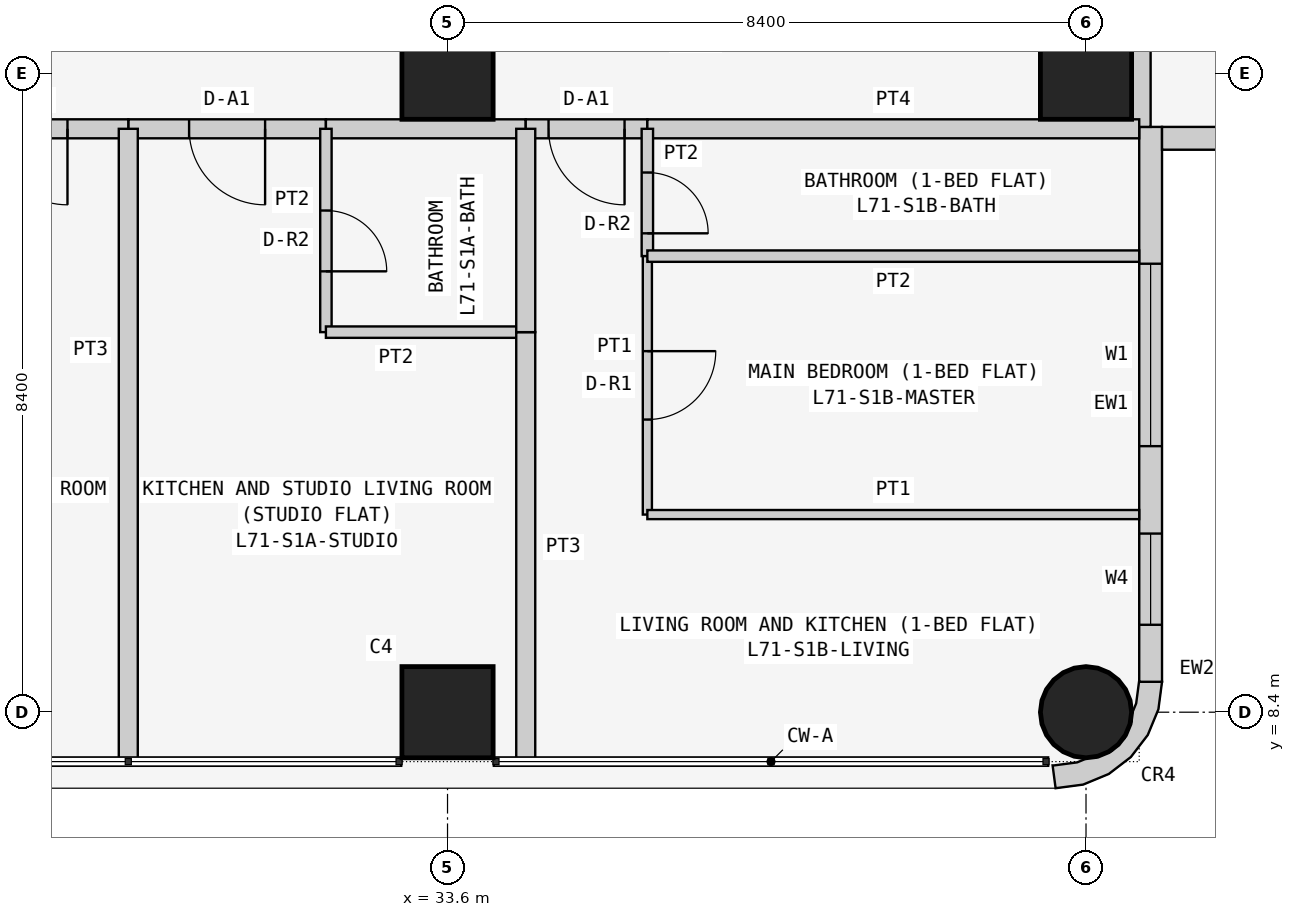
"""IFC4 building model, lengths in metres.
Left out: names, types, materials, properties, quantities, classifications, styles, units other than length and angle.
Written with IfcOpenShell. Run it as: python <this file> out.ifc"""

import sys

from ifc_helpers import new_model, si_unit, direction, frame, frame_2d, origin, origin_2d, place, context, subcontext, project, spatial, polyline, rectangle, circle, outline, extrude, element, fill, save


model = new_model("IFC4")
c1 = context("Model", 3, precision=1e-05, world=origin(), true_north=direction((0.0, 1.0)))
c2 = subcontext(c1, "Body", "Model", "MODEL_VIEW")
j1 = project(units=[si_unit("LENGTHUNIT", "METRE"), si_unit("PLANEANGLEUNIT", "RADIAN")], contexts=[c1])
p1 = place(None, origin())
s1 = spatial("IfcSite", under=j1, at=p1, CompositionType="ELEMENT")
p2 = place(p1, origin())
s2 = spatial("IfcBuilding", under=s1, at=p2, CompositionType="ELEMENT")
p3 = place(p2, frame((0.0, 0.0, 272.1)))
s3 = spatial("IfcBuildingStorey", under=s2, at=p3, CompositionType="ELEMENT", Elevation=272.1)
for number, where, z_axis, x_axis in (
    (1, (33.6, 8.4, 0.0), (0.0, 0.0, 1.0), (1.0, 0.0, 0.0)),
    (2, (33.6, 16.8, 0.0), (0.0, 0.0, 1.0), (1.0, 0.0, 0.0)),
):
    element("IfcColumn", number, at=place(p3, frame(where, z_axis=z_axis, x_axis=x_axis)), inside=s3, PredefinedType="COLUMN", context=c2, shape_type="SweptSolid", body=[
        extrude(rectangle(XDim=1.2, YDim=1.2, at=origin_2d()), origin(), (0.0, 0.0, 1.0), 3.6),
    ])
p4 = place(p3, frame((42.0, 8.4, 0.0), z_axis=(0.0, 0.0, 1.0), x_axis=(1.0, 0.0, 0.0)))
e3 = element("IfcColumn", 3, at=p4, inside=s3, PredefinedType="COLUMN", context=c2, shape_type="SweptSolid", body=[
    extrude(circle(Radius=0.6, at=origin_2d()), origin(), (0.0, 0.0, 1.0), 3.6),
])
p5 = place(p3, frame((42.0, 16.8, 0.0), z_axis=(0.0, 0.0, 1.0), x_axis=(1.0, 0.0, 0.0)))
e4 = element("IfcColumn", 4, at=p5, inside=s3, PredefinedType="COLUMN", context=c2, shape_type="SweptSolid", body=[
    extrude(rectangle(XDim=1.2, YDim=1.2, at=origin_2d()), origin(), (0.0, 0.0, 1.0), 3.6),
])
p6 = place(p3, frame((42.85, 8.8, 0.0), z_axis=(0.0, 0.0, 1.0), x_axis=(0.0, 1.0, 0.0)))
e5 = element("IfcWall", 5, at=p6, inside=s3, PredefinedType="SOLIDWALL", context=c2, shape_type="SweptSolid", body=[
    extrude(rectangle(XDim=7.3, YDim=0.3, at=frame_2d((3.65, 0.0))), origin(), (0.0, 0.0, 1.0), 3.45),
])
p7 = place(p6, frame((3.1, 0.0, 0.9)))
e6 = element("IfcOpeningElement", 6, at=p7, cuts=e5, PredefinedType="OPENING", context=c2, shape_type="SweptSolid", body=[
    extrude(rectangle(XDim=2.4, YDim=1.5, at=frame_2d((1.2, 0.75))), frame((0.0, 0.16, 0.0), z_axis=(0.0, -1.0, 0.0), x_axis=(1.0, 0.0, 0.0)), (0.0, 0.0, 1.0), 0.32),
])
p8 = place(p6, frame((0.75, 0.0, 0.9)))
e7 = element("IfcOpeningElement", 7, at=p8, cuts=e5, PredefinedType="OPENING", context=c2, shape_type="SweptSolid", body=[
    extrude(rectangle(XDim=1.2, YDim=1.5, at=frame_2d((0.6, 0.75))), frame((0.0, 0.16, 0.0), z_axis=(0.0, -1.0, 0.0), x_axis=(1.0, 0.0, 0.0)), (0.0, 0.0, 1.0), 0.32),
])
p9 = place(p3, frame((43.0, 15.95, 0.0), z_axis=(0.0, 0.0, 1.0), x_axis=(1.0, 0.0, 0.0)))
e8 = element("IfcWall", 8, at=p9, inside=s3, PredefinedType="SOLIDWALL", context=c2, shape_type="SweptSolid", body=[
    extrude(rectangle(XDim=7.0, YDim=0.3, at=frame_2d((3.5, 0.0))), origin(), (0.0, 0.0, 1.0), 3.45),
])
p10 = place(p9, frame((1.5, 0.0, 0.9)))
e9 = element("IfcOpeningElement", 9, at=p10, cuts=e8, PredefinedType="OPENING", context=c2, shape_type="SweptSolid", body=[
    extrude(rectangle(XDim=2.4, YDim=1.5, at=frame_2d((1.2, 0.75))), frame((0.0, 0.16, 0.0), z_axis=(0.0, -1.0, 0.0), x_axis=(1.0, 0.0, 0.0)), (0.0, 0.0, 1.0), 0.32),
])
p11 = place(p9, frame((5.05, 0.0, 0.9)))
e10 = element("IfcOpeningElement", 10, at=p11, cuts=e8, PredefinedType="OPENING", context=c2, shape_type="SweptSolid", body=[
    extrude(rectangle(XDim=1.2, YDim=1.5, at=frame_2d((0.6, 0.75))), frame((0.0, 0.16, 0.0), z_axis=(0.0, -1.0, 0.0), x_axis=(1.0, 0.0, 0.0)), (0.0, 0.0, 1.0), 0.32),
])
p12 = place(p3, frame((41.638, 7.824, 0.0), z_axis=(0.0, 0.0, 1.0), x_axis=(0.707106781187, -0.707106781187, 0.0)))
e11 = element("IfcWall", 11, at=p12, inside=s3, PredefinedType="SOLIDWALL", context=c2, shape_type="SweptSolid", body=[
    extrude(outline(polyline([(0.033, 1.469), (0.047, 1.455), (0.233, 1.212), (0.292, 1.069), (0.358, 1.003), (0.449, 0.782), (0.449, 0.543), (0.358, 0.322), (0.292, 0.257), (0.233, 0.114), (0.047, -0.129), (0.033, -0.143), (0.273, -0.327), (0.495, -0.037), (0.635, 0.301), (0.683, 0.663), (0.635, 1.025), (0.495, 1.363), (0.273, 1.653), (0.033, 1.469)])), origin(), (0.0, 0.0, 1.0), 3.45),
])
p13 = place(p3, frame((42.725, 22.971, 0.0), z_axis=(0.0, 0.0, 1.0), x_axis=(0.0, -1.0, 0.0)))
e12 = element("IfcWall", 12, at=p13, inside=s3, PredefinedType="PARTITIONING", context=c2, shape_type="SweptSolid", body=[
    extrude(rectangle(XDim=6.871, YDim=0.25, at=frame_2d((3.436, 0.0))), origin(), (0.0, 0.0, 1.0), 3.45),
])
p14 = place(p3, frame((32.0, 16.075, 0.0), z_axis=(0.0, 0.0, 1.0), x_axis=(-1.0, 0.0, 0.0)))
e13 = element("IfcWall", 13, at=p14, inside=s3, PredefinedType="PARTITIONING", context=c2, shape_type="SweptSolid", body=[
    extrude(rectangle(XDim=2.6, YDim=0.25, at=frame_2d((1.3, 0.0))), origin(), (0.0, 0.0, 1.0), 3.45),
])
p15 = place(p14, frame((0.8, 0.0, 0.0)))
e14 = element("IfcOpeningElement", 14, at=p15, cuts=e13, PredefinedType="OPENING", context=c2, shape_type="SweptSolid", body=[
    extrude(rectangle(XDim=1.0, YDim=2.1, at=frame_2d((0.5, 1.05))), frame((0.0, 0.135, 0.0), z_axis=(0.0, -1.0, 0.0), x_axis=(1.0, 0.0, 0.0)), (0.0, 0.0, 1.0), 0.27),
])
p16 = place(p3, frame((34.629, 16.075, 0.0), z_axis=(0.0, 0.0, 1.0), x_axis=(-1.0, 0.0, 0.0)))
e15 = element("IfcWall", 15, at=p16, inside=s3, PredefinedType="PARTITIONING", context=c2, shape_type="SweptSolid", body=[
    extrude(rectangle(XDim=2.629, YDim=0.25, at=frame_2d((1.314, 0.0))), origin(), (0.0, 0.0, 1.0), 3.45),
])
p17 = place(p3, frame((36.229, 16.075, 0.0), z_axis=(0.0, 0.0, 1.0), x_axis=(-1.0, 0.0, 0.0)))
e16 = element("IfcWall", 16, at=p17, inside=s3, PredefinedType="PARTITIONING", context=c2, shape_type="SweptSolid", body=[
    extrude(rectangle(XDim=1.6, YDim=0.25, at=frame_2d((0.8, 0.0))), origin(), (0.0, 0.0, 1.0), 3.45),
])
p18 = place(p17, frame((0.3, 0.0, 0.0)))
e17 = element("IfcOpeningElement", 17, at=p18, cuts=e16, PredefinedType="OPENING", context=c2, shape_type="SweptSolid", body=[
    extrude(rectangle(XDim=1.0, YDim=2.1, at=frame_2d((0.5, 1.05))), frame((0.0, 0.135, 0.0), z_axis=(0.0, -1.0, 0.0), x_axis=(1.0, 0.0, 0.0)), (0.0, 0.0, 1.0), 0.27),
])
p19 = place(p3, frame((42.7, 16.075, 0.0), z_axis=(0.0, 0.0, 1.0), x_axis=(-1.0, 0.0, 0.0)))
e18 = element("IfcWall", 18, at=p19, inside=s3, PredefinedType="PARTITIONING", context=c2, shape_type="SweptSolid", body=[
    extrude(rectangle(XDim=6.471, YDim=0.25, at=frame_2d((3.235, 0.0))), origin(), (0.0, 0.0, 1.0), 3.45),
])
p20 = place(p3, frame((29.4, 16.075, 0.0), z_axis=(0.0, 0.0, 1.0), x_axis=(-1.0, 0.0, 0.0)))
e19 = element("IfcWall", 19, at=p20, inside=s3, PredefinedType="PARTITIONING", context=c2, shape_type="SweptSolid", body=[
    extrude(rectangle(XDim=2.6, YDim=0.25, at=frame_2d((1.3, 0.0))), origin(), (0.0, 0.0, 1.0), 3.45),
])
p21 = place(p20, frame((0.8, 0.0, 0.0)))
e20 = element("IfcOpeningElement", 20, at=p21, cuts=e19, PredefinedType="OPENING", context=c2, shape_type="SweptSolid", body=[
    extrude(rectangle(XDim=1.0, YDim=2.1, at=frame_2d((0.5, 1.05))), frame((0.0, 0.135, 0.0), z_axis=(0.0, -1.0, 0.0), x_axis=(1.0, 0.0, 0.0)), (0.0, 0.0, 1.0), 0.27),
])
p22 = place(p3, frame((32.0, 16.075, 0.0), z_axis=(0.0, 0.0, 1.0), x_axis=(0.0, -1.0, 0.0)))
e21 = element("IfcWall", 21, at=p22, inside=s3, PredefinedType="PARTITIONING", context=c2, shape_type="SweptSolid", body=[
    extrude(rectangle(XDim=2.675, YDim=0.15, at=frame_2d((1.337, 0.0))), origin(), (0.0, 0.0, 1.0), 3.45),
])
p23 = place(p22, frame((1.075, 0.0, 0.0)))
e22 = element("IfcOpeningElement", 22, at=p23, cuts=e21, PredefinedType="OPENING", context=c2, shape_type="SweptSolid", body=[
    extrude(rectangle(XDim=0.8, YDim=2.1, at=frame_2d((0.4, 1.05))), frame((0.0, 0.085, 0.0), z_axis=(0.0, -1.0, 0.0), x_axis=(1.0, 0.0, 0.0)), (0.0, 0.0, 1.0), 0.17),
])
p24 = place(p3, frame((32.0, 13.4, 0.0), z_axis=(0.0, 0.0, 1.0), x_axis=(1.0, 0.0, 0.0)))
e23 = element("IfcWall", 23, at=p24, inside=s3, PredefinedType="PARTITIONING", context=c2, shape_type="SweptSolid", body=[
    extrude(rectangle(XDim=2.629, YDim=0.15, at=frame_2d((1.314, 0.0))), origin(), (0.0, 0.0, 1.0), 3.45),
])
p25 = place(p3, frame((34.629, 13.4, 0.0), z_axis=(0.0, 0.0, 1.0), x_axis=(0.0, -1.0, 0.0)))
e24 = element("IfcWall", 24, at=p25, inside=s3, PredefinedType="PARTITIONING", context=c2, shape_type="SweptSolid", body=[
    extrude(rectangle(XDim=5.65, YDim=0.25, at=frame_2d((2.825, 0.0))), origin(), (0.0, 0.0, 1.0), 3.45),
])
p26 = place(p3, frame((29.4, 7.75, 0.0), z_axis=(0.0, 0.0, 1.0), x_axis=(0.0, 1.0, 0.0)))
e25 = element("IfcWall", 25, at=p26, inside=s3, PredefinedType="PARTITIONING", context=c2, shape_type="SweptSolid", body=[
    extrude(rectangle(XDim=8.325, YDim=0.25, at=frame_2d((4.163, 0.0))), origin(), (0.0, 0.0, 1.0), 2.848),
])
p27 = place(p3, frame((34.629, 13.4, 0.0), z_axis=(0.0, 0.0, 1.0), x_axis=(0.0, 1.0, 0.0)))
e26 = element("IfcWall", 26, at=p27, inside=s3, PredefinedType="PARTITIONING", context=c2, shape_type="SweptSolid", body=[
    extrude(rectangle(XDim=2.675, YDim=0.25, at=frame_2d((1.337, 0.0))), origin(), (0.0, 0.0, 1.0), 3.45),
])
p28 = place(p3, frame((36.229, 16.075, 0.0), z_axis=(0.0, 0.0, 1.0), x_axis=(0.0, -1.0, 0.0)))
e27 = element("IfcWall", 27, at=p28, inside=s3, PredefinedType="PARTITIONING", context=c2, shape_type="SweptSolid", body=[
    extrude(rectangle(XDim=1.675, YDim=0.15, at=frame_2d((0.837, 0.0))), origin(), (0.0, 0.0, 1.0), 3.45),
])
p29 = place(p28, frame((0.575, 0.0, 0.0)))
e28 = element("IfcOpeningElement", 28, at=p29, cuts=e27, PredefinedType="OPENING", context=c2, shape_type="SweptSolid", body=[
    extrude(rectangle(XDim=0.8, YDim=2.1, at=frame_2d((0.4, 1.05))), frame((0.0, 0.085, 0.0), z_axis=(0.0, -1.0, 0.0), x_axis=(1.0, 0.0, 0.0)), (0.0, 0.0, 1.0), 0.17),
])
p30 = place(p3, frame((36.229, 14.4, 0.0), z_axis=(0.0, 0.0, 1.0), x_axis=(0.0, -1.0, 0.0)))
e29 = element("IfcWall", 29, at=p30, inside=s3, PredefinedType="PARTITIONING", context=c2, shape_type="SweptSolid", body=[
    extrude(rectangle(XDim=3.4, YDim=0.12, at=frame_2d((1.7, 0.0))), origin(), (0.0, 0.0, 1.0), 3.45),
])
p31 = place(p30, frame((1.25, 0.0, 0.0)))
e30 = element("IfcOpeningElement", 30, at=p31, cuts=e29, PredefinedType="OPENING", context=c2, shape_type="SweptSolid", body=[
    extrude(rectangle(XDim=0.9, YDim=2.1, at=frame_2d((0.45, 1.05))), frame((0.0, 0.07, 0.0), z_axis=(0.0, -1.0, 0.0), x_axis=(1.0, 0.0, 0.0)), (0.0, 0.0, 1.0), 0.14),
])
p32 = place(p3, frame((36.229, 11.0, 0.0), z_axis=(0.0, 0.0, 1.0), x_axis=(1.0, 0.0, 0.0)))
e31 = element("IfcWall", 31, at=p32, inside=s3, PredefinedType="PARTITIONING", context=c2, shape_type="SweptSolid", body=[
    extrude(rectangle(XDim=6.471, YDim=0.12, at=frame_2d((3.235, 0.0))), origin(), (0.0, 0.0, 1.0), 3.45),
])
p33 = place(p3, frame((36.229, 14.4, 0.0), z_axis=(0.0, 0.0, 1.0), x_axis=(1.0, 0.0, 0.0)))
e32 = element("IfcWall", 32, at=p33, inside=s3, PredefinedType="PARTITIONING", context=c2, shape_type="SweptSolid", body=[
    extrude(rectangle(XDim=6.471, YDim=0.15, at=frame_2d((3.235, 0.0))), origin(), (0.0, 0.0, 1.0), 3.45),
])
p34 = place(p7, origin())
e33 = element("IfcWindow", 33, at=p34, inside=s3, PartitioningType="SINGLE_PANEL", PredefinedType="WINDOW", context=c2, shape_type="SweptSolid", body=[
    extrude(rectangle(XDim=2.4, YDim=1.5, at=frame_2d((1.2, 0.75))), frame((0.0, 0.03, 0.0), z_axis=(0.0, -1.0, 0.0), x_axis=(1.0, 0.0, 0.0)), (0.0, 0.0, 1.0), 0.06),
])
fill(e6, e33)
p35 = place(p8, origin())
e34 = element("IfcWindow", 34, at=p35, inside=s3, PartitioningType="SINGLE_PANEL", PredefinedType="WINDOW", context=c2, shape_type="SweptSolid", body=[
    extrude(rectangle(XDim=1.2, YDim=1.5, at=frame_2d((0.6, 0.75))), frame((0.0, 0.03, 0.0), z_axis=(0.0, -1.0, 0.0), x_axis=(1.0, 0.0, 0.0)), (0.0, 0.0, 1.0), 0.06),
])
fill(e7, e34)
p36 = place(p15, origin())
e35 = element("IfcDoor", 35, at=p36, inside=s3, OperationType="SINGLE_SWING_LEFT", PredefinedType="DOOR", context=c2, shape_type="SweptSolid", body=[
    extrude(rectangle(XDim=1.0, YDim=2.1, at=frame_2d((0.5, 1.05))), frame((0.0, 0.025, 0.0), z_axis=(0.0, -1.0, 0.0), x_axis=(1.0, 0.0, 0.0)), (0.0, 0.0, 1.0), 0.05),
])
fill(e14, e35)
p37 = place(p23, origin())
e36 = element("IfcDoor", 36, at=p37, inside=s3, OperationType="SINGLE_SWING_RIGHT", PredefinedType="DOOR", context=c2, shape_type="SweptSolid", body=[
    extrude(rectangle(XDim=0.8, YDim=2.1, at=frame_2d((0.4, 1.05))), frame((0.0, 0.025, 0.0), z_axis=(0.0, -1.0, 0.0), x_axis=(1.0, 0.0, 0.0)), (0.0, 0.0, 1.0), 0.05),
])
fill(e22, e36)
p38 = place(p18, origin())
e37 = element("IfcDoor", 37, at=p38, inside=s3, OperationType="SINGLE_SWING_LEFT", PredefinedType="DOOR", context=c2, shape_type="SweptSolid", body=[
    extrude(rectangle(XDim=1.0, YDim=2.1, at=frame_2d((0.5, 1.05))), frame((0.0, 0.025, 0.0), z_axis=(0.0, -1.0, 0.0), x_axis=(1.0, 0.0, 0.0)), (0.0, 0.0, 1.0), 0.05),
])
fill(e17, e37)
p39 = place(p29, origin())
e38 = element("IfcDoor", 38, at=p39, inside=s3, OperationType="SINGLE_SWING_RIGHT", PredefinedType="DOOR", context=c2, shape_type="SweptSolid", body=[
    extrude(rectangle(XDim=0.8, YDim=2.1, at=frame_2d((0.4, 1.05))), frame((0.0, 0.025, 0.0), z_axis=(0.0, -1.0, 0.0), x_axis=(1.0, 0.0, 0.0)), (0.0, 0.0, 1.0), 0.05),
])
fill(e28, e38)
p40 = place(p31, origin())
e39 = element("IfcDoor", 39, at=p40, inside=s3, OperationType="SINGLE_SWING_LEFT", PredefinedType="DOOR", context=c2, shape_type="SweptSolid", body=[
    extrude(rectangle(XDim=0.9, YDim=2.1, at=frame_2d((0.45, 1.05))), frame((0.0, 0.025, 0.0), z_axis=(0.0, -1.0, 0.0), x_axis=(1.0, 0.0, 0.0)), (0.0, 0.0, 1.0), 0.05),
])
fill(e30, e39)
p41 = place(p21, origin())
e40 = element("IfcDoor", 40, at=p41, inside=s3, OperationType="SINGLE_SWING_LEFT", PredefinedType="DOOR", context=c2, shape_type="SweptSolid", body=[
    extrude(rectangle(XDim=1.0, YDim=2.1, at=frame_2d((0.5, 1.05))), frame((0.0, 0.025, 0.0), z_axis=(0.0, -1.0, 0.0), x_axis=(1.0, 0.0, 0.0)), (0.0, 0.0, 1.0), 0.05),
])
fill(e20, e40)
save(model, sys.argv[1])
